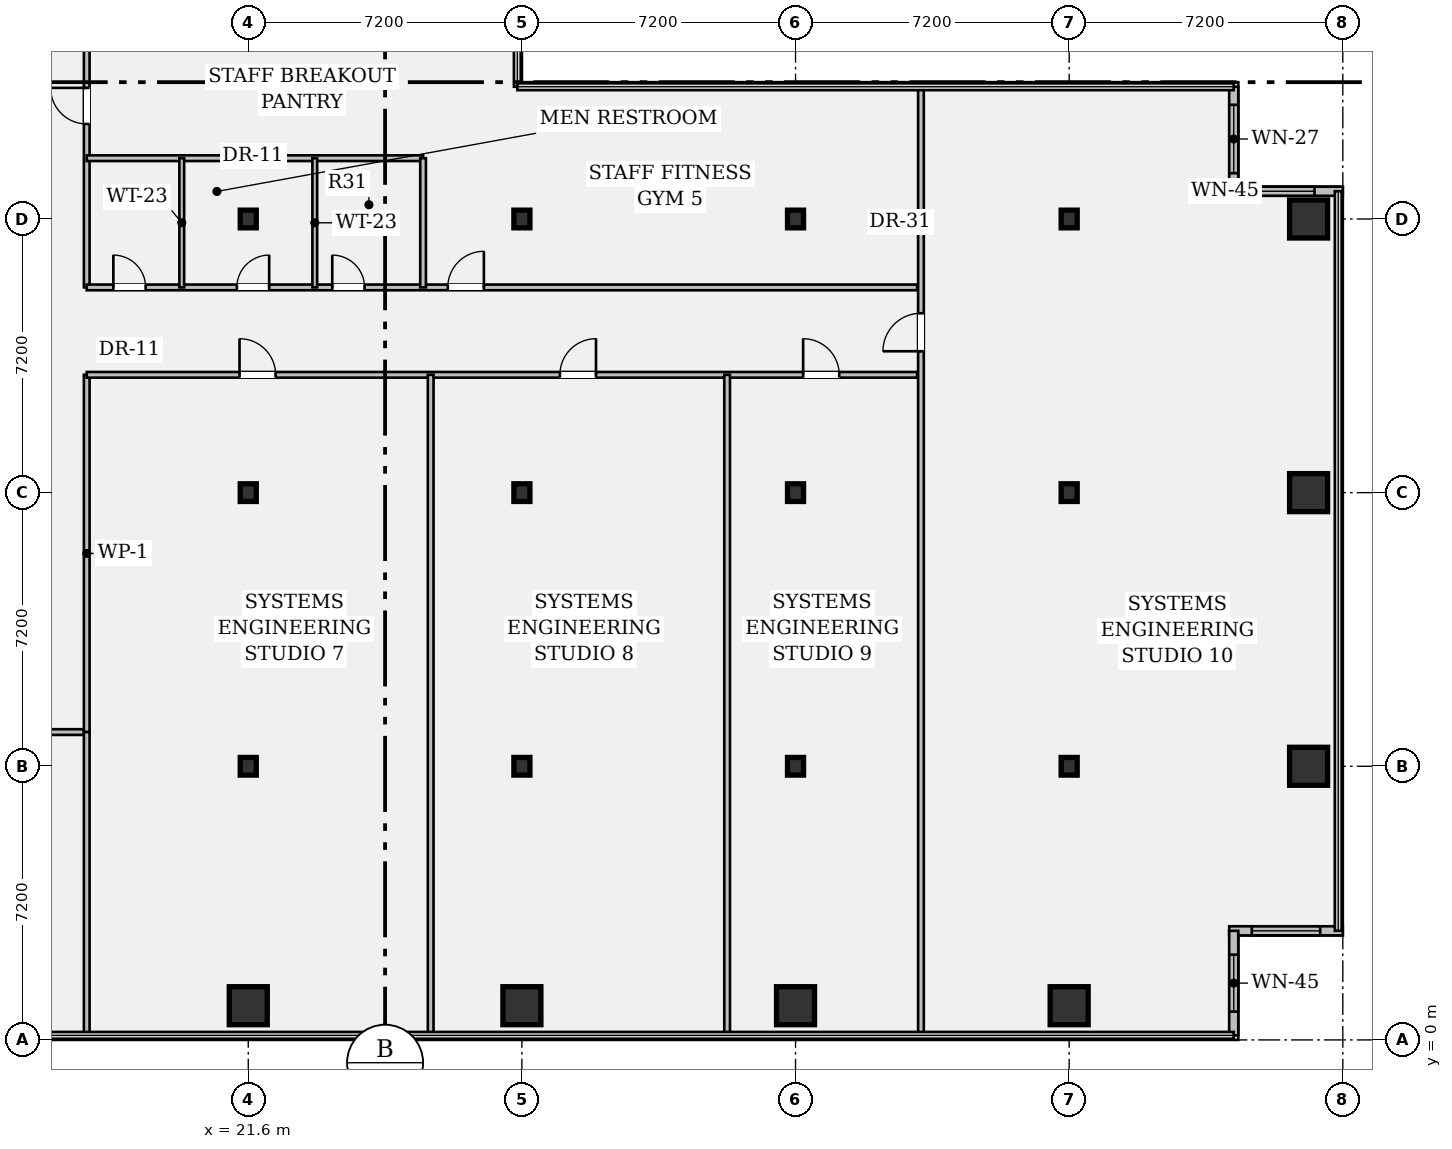
"""IFC4 building model, lengths in metres.
Left out: names, types, materials, properties, quantities, classifications, styles, units other than length and angle.
Written with IfcOpenShell. Run it as: python <this file> out.ifc"""

import sys

from ifc_helpers import new_model, si_unit, direction, frame, frame_2d, origin, origin_2d, place, context, subcontext, project, spatial, rectangle, hollow_rectangle, i_section, extrude, element, fill, save


model = new_model("IFC4")
c1 = context("Model", 3, precision=1e-05, world=origin(), true_north=direction((0.0, 1.0)))
c2 = subcontext(c1, "Body", "Model", "MODEL_VIEW")
j1 = project(units=[si_unit("LENGTHUNIT", "METRE"), si_unit("PLANEANGLEUNIT", "RADIAN")], contexts=[c1])
p1 = place(None, origin())
s1 = spatial("IfcSite", under=j1, at=p1, CompositionType="ELEMENT")
p2 = place(p1, origin())
s2 = spatial("IfcBuilding", under=s1, at=p2, CompositionType="ELEMENT")
p3 = place(p2, frame((0.0, 0.0, 73.5)))
s3 = spatial("IfcBuildingStorey", under=s2, at=p3, CompositionType="ELEMENT", Elevation=73.5)
p4 = place(p3, frame((21.6, 0.9, 0.0), z_axis=(0.0, 0.0, 1.0), x_axis=(1.0, 0.0, 0.0)))
e1 = element("IfcColumn", 1, at=p4, inside=s3, PredefinedType="COLUMN", context=c2, shape_type="SweptSolid", body=[
    extrude(hollow_rectangle(XDim=1.0, YDim=1.0, WallThickness=0.065, at=origin_2d()), origin(), (0.0, 0.0, 1.0), 3.57),
])
for number, where, z_axis, x_axis in (
    (2, (21.6, 7.2, 0.0), (0.0, 0.0, 1.0), (1.0, 0.0, 0.0)),
    (3, (21.6, 14.4, 0.0), (0.0, 0.0, 1.0), (1.0, 0.0, 0.0)),
    (4, (21.6, 21.6, 0.0), (0.0, 0.0, 1.0), (1.0, 0.0, 0.0)),
):
    element("IfcColumn", number, at=place(p3, frame(where, z_axis=z_axis, x_axis=x_axis)), inside=s3, PredefinedType="COLUMN", context=c2, shape_type="SweptSolid", body=[
        extrude(i_section(OverallWidth=0.422, OverallDepth=0.465, WebThickness=0.045, FlangeThickness=0.073, FilletRadius=0.018, at=origin_2d()), origin(), (0.0, 0.0, 1.0), 3.57),
    ])
p5 = place(p3, frame((28.8, 0.9, 0.0), z_axis=(0.0, 0.0, 1.0), x_axis=(1.0, 0.0, 0.0)))
e5 = element("IfcColumn", 5, at=p5, inside=s3, PredefinedType="COLUMN", context=c2, shape_type="SweptSolid", body=[
    extrude(hollow_rectangle(XDim=1.0, YDim=1.0, WallThickness=0.065, at=origin_2d()), origin(), (0.0, 0.0, 1.0), 3.57),
])
for number, where, z_axis, x_axis in (
    (6, (28.8, 7.2, 0.0), (0.0, 0.0, 1.0), (1.0, 0.0, 0.0)),
    (7, (28.8, 14.4, 0.0), (0.0, 0.0, 1.0), (1.0, 0.0, 0.0)),
    (8, (28.8, 21.6, 0.0), (0.0, 0.0, 1.0), (1.0, 0.0, 0.0)),
):
    element("IfcColumn", number, at=place(p3, frame(where, z_axis=z_axis, x_axis=x_axis)), inside=s3, PredefinedType="COLUMN", context=c2, shape_type="SweptSolid", body=[
        extrude(i_section(OverallWidth=0.422, OverallDepth=0.465, WebThickness=0.045, FlangeThickness=0.073, FilletRadius=0.018, at=origin_2d()), origin(), (0.0, 0.0, 1.0), 3.57),
    ])
p6 = place(p3, frame((36.0, 0.9, 0.0), z_axis=(0.0, 0.0, 1.0), x_axis=(1.0, 0.0, 0.0)))
e9 = element("IfcColumn", 9, at=p6, inside=s3, PredefinedType="COLUMN", context=c2, shape_type="SweptSolid", body=[
    extrude(hollow_rectangle(XDim=1.0, YDim=1.0, WallThickness=0.065, at=origin_2d()), origin(), (0.0, 0.0, 1.0), 3.57),
])
for number, where, z_axis, x_axis in (
    (10, (36.0, 7.2, 0.0), (0.0, 0.0, 1.0), (1.0, 0.0, 0.0)),
    (11, (36.0, 14.4, 0.0), (0.0, 0.0, 1.0), (1.0, 0.0, 0.0)),
    (12, (36.0, 21.6, 0.0), (0.0, 0.0, 1.0), (1.0, 0.0, 0.0)),
):
    element("IfcColumn", number, at=place(p3, frame(where, z_axis=z_axis, x_axis=x_axis)), inside=s3, PredefinedType="COLUMN", context=c2, shape_type="SweptSolid", body=[
        extrude(i_section(OverallWidth=0.422, OverallDepth=0.465, WebThickness=0.045, FlangeThickness=0.073, FilletRadius=0.018, at=origin_2d()), origin(), (0.0, 0.0, 1.0), 3.57),
    ])
p7 = place(p3, frame((43.2, 0.9, 0.0), z_axis=(0.0, 0.0, 1.0), x_axis=(1.0, 0.0, 0.0)))
e13 = element("IfcColumn", 13, at=p7, inside=s3, PredefinedType="COLUMN", context=c2, shape_type="SweptSolid", body=[
    extrude(hollow_rectangle(XDim=1.0, YDim=1.0, WallThickness=0.065, at=origin_2d()), origin(), (0.0, 0.0, 1.0), 3.57),
])
for number, where, z_axis, x_axis in (
    (14, (43.2, 7.2, 0.0), (0.0, 0.0, 1.0), (1.0, 0.0, 0.0)),
    (15, (43.2, 14.4, 0.0), (0.0, 0.0, 1.0), (1.0, 0.0, 0.0)),
    (16, (43.2, 21.6, 0.0), (0.0, 0.0, 1.0), (1.0, 0.0, 0.0)),
):
    element("IfcColumn", number, at=place(p3, frame(where, z_axis=z_axis, x_axis=x_axis)), inside=s3, PredefinedType="COLUMN", context=c2, shape_type="SweptSolid", body=[
        extrude(i_section(OverallWidth=0.422, OverallDepth=0.465, WebThickness=0.045, FlangeThickness=0.073, FilletRadius=0.018, at=origin_2d()), origin(), (0.0, 0.0, 1.0), 3.57),
    ])
for number, where, z_axis, x_axis in (
    (17, (49.5, 7.2, 0.0), (0.0, 0.0, 1.0), (1.0, 0.0, 0.0)),
    (18, (49.5, 14.4, 0.0), (0.0, 0.0, 1.0), (1.0, 0.0, 0.0)),
    (19, (49.5, 21.6, 0.0), (0.0, 0.0, 1.0), (1.0, 0.0, 0.0)),
):
    element("IfcColumn", number, at=place(p3, frame(where, z_axis=z_axis, x_axis=x_axis)), inside=s3, PredefinedType="COLUMN", context=c2, shape_type="SweptSolid", body=[
        extrude(hollow_rectangle(XDim=1.0, YDim=1.0, WallThickness=0.065, at=origin_2d()), origin(), (0.0, 0.0, 1.0), 3.57),
    ])
p8 = place(p3, frame((47.53, 25.08, 0.0), z_axis=(0.0, 0.0, 1.0), x_axis=(0.0, -1.0, 0.0)))
e20 = element("IfcWall", 20, at=p8, inside=s3, PredefinedType="STANDARD", context=c2, shape_type="SweptSolid", body=[
    extrude(rectangle(XDim=2.75, YDim=0.24, at=frame_2d((1.375, 0.0))), origin(), (0.0, 0.0, 1.0), 3.57),
])
p9 = place(p8, frame((0.475, 0.0, 0.95)))
e21 = element("IfcOpeningElement", 21, at=p9, cuts=e20, PredefinedType="OPENING", context=c2, shape_type="SweptSolid", body=[
    extrude(rectangle(XDim=1.8, YDim=1.35, at=frame_2d((0.9, 0.675))), frame((0.0, 0.132, 0.0), z_axis=(0.0, -1.0, 0.0), x_axis=(1.0, 0.0, 0.0)), (0.0, 0.0, 1.0), 0.264),
])
p10 = place(p3, frame((47.41, 22.33, 0.0), z_axis=(0.0, 0.0, 1.0), x_axis=(1.0, 0.0, 0.0)))
e22 = element("IfcWall", 22, at=p10, inside=s3, PredefinedType="STANDARD", context=c2, shape_type="SweptSolid", body=[
    extrude(rectangle(XDim=2.99, YDim=0.24, at=frame_2d((1.495, 0.0))), origin(), (0.0, 0.0, 1.0), 3.57),
])
p11 = place(p10, frame((0.745, 0.0, 0.95)))
e23 = element("IfcOpeningElement", 23, at=p11, cuts=e22, PredefinedType="OPENING", context=c2, shape_type="SweptSolid", body=[
    extrude(rectangle(XDim=1.5, YDim=1.8, at=frame_2d((0.75, 0.9))), frame((0.0, 0.132, 0.0), z_axis=(0.0, -1.0, 0.0), x_axis=(1.0, 0.0, 0.0)), (0.0, 0.0, 1.0), 0.264),
])
p12 = place(p3, frame((50.4, 2.87, 0.0), z_axis=(0.0, 0.0, 1.0), x_axis=(-1.0, 0.0, 0.0)))
e24 = element("IfcWall", 24, at=p12, inside=s3, PredefinedType="STANDARD", context=c2, shape_type="SweptSolid", body=[
    extrude(rectangle(XDim=2.99, YDim=0.24, at=frame_2d((1.495, 0.0))), origin(), (0.0, 0.0, 1.0), 3.57),
])
p13 = place(p12, frame((0.595, 0.0, 0.95)))
e25 = element("IfcOpeningElement", 25, at=p13, cuts=e24, PredefinedType="OPENING", context=c2, shape_type="SweptSolid", body=[
    extrude(rectangle(XDim=1.8, YDim=1.35, at=frame_2d((0.9, 0.675))), frame((0.0, 0.132, 0.0), z_axis=(0.0, -1.0, 0.0), x_axis=(1.0, 0.0, 0.0)), (0.0, 0.0, 1.0), 0.264),
])
p14 = place(p3, frame((47.53, 2.87, 0.0), z_axis=(0.0, 0.0, 1.0), x_axis=(0.0, -1.0, 0.0)))
e26 = element("IfcWall", 26, at=p14, inside=s3, PredefinedType="STANDARD", context=c2, shape_type="SweptSolid", body=[
    extrude(rectangle(XDim=2.75, YDim=0.24, at=frame_2d((1.375, 0.0))), origin(), (0.0, 0.0, 1.0), 3.57),
])
p15 = place(p14, frame((0.625, 0.0, 0.95)))
e27 = element("IfcOpeningElement", 27, at=p15, cuts=e26, PredefinedType="OPENING", context=c2, shape_type="SweptSolid", body=[
    extrude(rectangle(XDim=1.5, YDim=1.8, at=frame_2d((0.75, 0.9))), frame((0.0, 0.132, 0.0), z_axis=(0.0, -1.0, 0.0), x_axis=(1.0, 0.0, 0.0)), (0.0, 0.0, 1.0), 0.264),
])
p16 = place(p3, frame((14.4, 8.1, 0.0), z_axis=(0.0, 0.0, 1.0), x_axis=(1.0, 0.0, 0.0)))
e28 = element("IfcWall", 28, at=p16, inside=s3, PredefinedType="PARTITIONING", context=c2, shape_type="SweptSolid", body=[
    extrude(rectangle(XDim=2.95, YDim=0.15, at=frame_2d((1.475, 0.0))), origin(), (0.0, 0.0, 1.0), 3.088),
])
p17 = place(p16, frame((0.95, 0.0, 0.0)))
e29 = element("IfcOpeningElement", 29, at=p17, cuts=e28, PredefinedType="OPENING", context=c2, shape_type="SweptSolid", body=[
    extrude(rectangle(XDim=0.95, YDim=2.15, at=frame_2d((0.475, 1.075))), frame((0.0, 0.087, 0.0), z_axis=(0.0, -1.0, 0.0), x_axis=(1.0, 0.0, 0.0)), (0.0, 0.0, 1.0), 0.174),
])
p18 = place(p3, frame((17.35, 8.1, 0.0), z_axis=(0.0, 0.0, 1.0), x_axis=(0.0, 1.0, 0.0)))
e30 = element("IfcWall", 30, at=p18, inside=s3, PredefinedType="PARTITIONING", context=c2, shape_type="SweptSolid", body=[
    extrude(rectangle(XDim=9.4, YDim=0.15, at=frame_2d((4.7, 0.0))), origin(), (0.0, 0.0, 1.0), 2.783),
])
p19 = place(p3, frame((17.35, 19.8, 0.0), z_axis=(0.0, 0.0, 1.0), x_axis=(0.0, 1.0, 0.0)))
e31 = element("IfcWall", 31, at=p19, inside=s3, PredefinedType="PARTITIONING", context=c2, shape_type="SweptSolid", body=[
    extrude(rectangle(XDim=16.1, YDim=0.15, at=frame_2d((8.05, 0.0))), origin(), (0.0, 0.0, 1.0), 2.783),
])
p20 = place(p19, frame((4.3, 0.0, 0.0)))
e32 = element("IfcOpeningElement", 32, at=p20, cuts=e31, PredefinedType="OPENING", context=c2, shape_type="SweptSolid", body=[
    extrude(rectangle(XDim=0.95, YDim=2.15, at=frame_2d((0.475, 1.075))), frame((0.0, 0.087, 0.0), z_axis=(0.0, -1.0, 0.0), x_axis=(1.0, 0.0, 0.0)), (0.0, 0.0, 1.0), 0.174),
])
p21 = place(p19, frame((8.0, 0.0, 0.0)))
e33 = element("IfcOpeningElement", 33, at=p21, cuts=e31, PredefinedType="OPENING", context=c2, shape_type="SweptSolid", body=[
    extrude(rectangle(XDim=0.95, YDim=2.15, at=frame_2d((0.475, 1.075))), frame((0.0, 0.087, 0.0), z_axis=(0.0, -1.0, 0.0), x_axis=(1.0, 0.0, 0.0)), (0.0, 0.0, 1.0), 0.174),
])
p22 = place(p19, frame((12.5, 0.0, 0.0)))
e34 = element("IfcOpeningElement", 34, at=p22, cuts=e31, PredefinedType="OPENING", context=c2, shape_type="SweptSolid", body=[
    extrude(rectangle(XDim=0.95, YDim=2.15, at=frame_2d((0.475, 1.075))), frame((0.0, 0.087, 0.0), z_axis=(0.0, -1.0, 0.0), x_axis=(1.0, 0.0, 0.0)), (0.0, 0.0, 1.0), 0.174),
])
p23 = place(p3, frame((17.35, 17.5, 0.0), z_axis=(0.0, 0.0, 1.0), x_axis=(1.0, 0.0, 0.0)))
e35 = element("IfcWall", 35, at=p23, inside=s3, PredefinedType="PARTITIONING", context=c2, shape_type="SweptSolid", body=[
    extrude(rectangle(XDim=21.85, YDim=0.15, at=frame_2d((10.925, 0.0))), origin(), (0.0, 0.0, 1.0), 2.783),
])
p24 = place(p23, frame((4.02, 0.0, 0.0)))
e36 = element("IfcOpeningElement", 36, at=p24, cuts=e35, PredefinedType="OPENING", context=c2, shape_type="SweptSolid", body=[
    extrude(rectangle(XDim=0.95, YDim=2.15, at=frame_2d((0.475, 1.075))), frame((0.0, 0.087, 0.0), z_axis=(0.0, -1.0, 0.0), x_axis=(1.0, 0.0, 0.0)), (0.0, 0.0, 1.0), 0.174),
])
p25 = place(p23, frame((12.45, 0.0, 0.0)))
e37 = element("IfcOpeningElement", 37, at=p25, cuts=e35, PredefinedType="OPENING", context=c2, shape_type="SweptSolid", body=[
    extrude(rectangle(XDim=0.95, YDim=2.15, at=frame_2d((0.475, 1.075))), frame((0.0, 0.087, 0.0), z_axis=(0.0, -1.0, 0.0), x_axis=(1.0, 0.0, 0.0)), (0.0, 0.0, 1.0), 0.174),
])
p26 = place(p23, frame((18.85, 0.0, 0.0)))
e38 = element("IfcOpeningElement", 38, at=p26, cuts=e35, PredefinedType="OPENING", context=c2, shape_type="SweptSolid", body=[
    extrude(rectangle(XDim=0.95, YDim=2.15, at=frame_2d((0.475, 1.075))), frame((0.0, 0.087, 0.0), z_axis=(0.0, -1.0, 0.0), x_axis=(1.0, 0.0, 0.0)), (0.0, 0.0, 1.0), 0.174),
])
p27 = place(p3, frame((17.35, 19.8, 0.0), z_axis=(0.0, 0.0, 1.0), x_axis=(1.0, 0.0, 0.0)))
e39 = element("IfcWall", 39, at=p27, inside=s3, PredefinedType="PARTITIONING", context=c2, shape_type="SweptSolid", body=[
    extrude(rectangle(XDim=21.85, YDim=0.15, at=frame_2d((10.925, 0.0))), origin(), (0.0, 0.0, 1.0), 2.783),
])
p28 = place(p27, frame((0.7, 0.0, 0.0)))
e40 = element("IfcOpeningElement", 40, at=p28, cuts=e39, PredefinedType="OPENING", context=c2, shape_type="SweptSolid", body=[
    extrude(rectangle(XDim=0.85, YDim=2.15, at=frame_2d((0.425, 1.075))), frame((0.0, 0.087, 0.0), z_axis=(0.0, -1.0, 0.0), x_axis=(1.0, 0.0, 0.0)), (0.0, 0.0, 1.0), 0.174),
])
p29 = place(p27, frame((3.95, 0.0, 0.0)))
e41 = element("IfcOpeningElement", 41, at=p29, cuts=e39, PredefinedType="OPENING", context=c2, shape_type="SweptSolid", body=[
    extrude(rectangle(XDim=0.85, YDim=2.15, at=frame_2d((0.425, 1.075))), frame((0.0, 0.087, 0.0), z_axis=(0.0, -1.0, 0.0), x_axis=(1.0, 0.0, 0.0)), (0.0, 0.0, 1.0), 0.174),
])
p30 = place(p27, frame((6.46, 0.0, 0.0)))
e42 = element("IfcOpeningElement", 42, at=p30, cuts=e39, PredefinedType="OPENING", context=c2, shape_type="SweptSolid", body=[
    extrude(rectangle(XDim=0.85, YDim=2.15, at=frame_2d((0.425, 1.075))), frame((0.0, 0.087, 0.0), z_axis=(0.0, -1.0, 0.0), x_axis=(1.0, 0.0, 0.0)), (0.0, 0.0, 1.0), 0.174),
])
p31 = place(p27, frame((9.5, 0.0, 0.0)))
e43 = element("IfcOpeningElement", 43, at=p31, cuts=e39, PredefinedType="OPENING", context=c2, shape_type="SweptSolid", body=[
    extrude(rectangle(XDim=0.95, YDim=2.15, at=frame_2d((0.475, 1.075))), frame((0.0, 0.087, 0.0), z_axis=(0.0, -1.0, 0.0), x_axis=(1.0, 0.0, 0.0)), (0.0, 0.0, 1.0), 0.174),
])
p32 = place(p3, frame((39.3, 0.12, 0.0), z_axis=(0.0, 0.0, 1.0), x_axis=(0.0, 1.0, 0.0)))
e44 = element("IfcWall", 44, at=p32, inside=s3, PredefinedType="PARTITIONING", context=c2, shape_type="SweptSolid", body=[
    extrude(rectangle(XDim=24.96, YDim=0.15, at=frame_2d((12.48, 0.0))), origin(), (0.0, 0.0, 1.0), 2.783),
])
p33 = place(p32, frame((18.0, 0.0, 0.0)))
e45 = element("IfcOpeningElement", 45, at=p33, cuts=e44, PredefinedType="OPENING", context=c2, shape_type="SweptSolid", body=[
    extrude(rectangle(XDim=1.0, YDim=2.15, at=frame_2d((0.5, 1.075))), frame((0.0, 0.087, 0.0), z_axis=(0.0, -1.0, 0.0), x_axis=(1.0, 0.0, 0.0)), (0.0, 0.0, 1.0), 0.174),
])
p34 = place(p3, frame((17.35, 23.2, 0.0), z_axis=(0.0, 0.0, 1.0), x_axis=(1.0, 0.0, 0.0)))
e46 = element("IfcWall", 46, at=p34, inside=s3, PredefinedType="PARTITIONING", context=c2, shape_type="SweptSolid", body=[
    extrude(rectangle(XDim=8.85, YDim=0.15, at=frame_2d((4.425, 0.0))), origin(), (0.0, 0.0, 1.0), 2.783),
])
p35 = place(p3, frame((26.2, 19.8, 0.0), z_axis=(0.0, 0.0, 1.0), x_axis=(0.0, 1.0, 0.0)))
e47 = element("IfcWall", 47, at=p35, inside=s3, PredefinedType="PARTITIONING", context=c2, shape_type="SweptSolid", body=[
    extrude(rectangle(XDim=3.4, YDim=0.15, at=frame_2d((1.7, 0.0))), origin(), (0.0, 0.0, 1.0), 2.783),
])
for number, where, z_axis, x_axis in (
    (48, (19.85, 19.8, 0.0), (0.0, 0.0, 1.0), (0.0, 1.0, 0.0)),
    (49, (23.35, 19.8, 0.0), (0.0, 0.0, 1.0), (0.0, 1.0, 0.0)),
):
    element("IfcWall", number, at=place(p3, frame(where, z_axis=z_axis, x_axis=x_axis)), inside=s3, PredefinedType="PARTITIONING", context=c2, shape_type="SweptSolid", body=[
        extrude(rectangle(XDim=3.4, YDim=0.125, at=frame_2d((1.7, 0.0))), origin(), (0.0, 0.0, 1.0), 2.783),
    ])
p36 = place(p3, frame((17.35, 0.12, 0.0), z_axis=(0.0, 0.0, 1.0), x_axis=(0.0, 1.0, 0.0)))
e50 = element("IfcWall", 50, at=p36, inside=s3, PredefinedType="PARTITIONING", context=c2, shape_type="SweptSolid", body=[
    extrude(rectangle(XDim=7.98, YDim=0.15, at=frame_2d((3.99, 0.0))), origin(), (0.0, 0.0, 1.0), 2.783),
])
for number, where, z_axis, x_axis in (
    (51, (26.4, 0.12, 0.0), (0.0, 0.0, 1.0), (0.0, 1.0, 0.0)),
    (52, (34.2, 0.12, 0.0), (0.0, 0.0, 1.0), (0.0, 1.0, 0.0)),
):
    element("IfcWall", number, at=place(p3, frame(where, z_axis=z_axis, x_axis=x_axis)), inside=s3, PredefinedType="PARTITIONING", context=c2, shape_type="SweptSolid", body=[
        extrude(rectangle(XDim=17.38, YDim=0.15, at=frame_2d((8.69, 0.0))), origin(), (0.0, 0.0, 1.0), 2.783),
    ])
p37 = place(p9, origin())
e53 = element("IfcWindow", 53, at=p37, inside=s3, PartitioningType="SINGLE_PANEL", PredefinedType="WINDOW", context=c2, shape_type="SweptSolid", body=[
    extrude(rectangle(XDim=1.8, YDim=1.35, at=frame_2d((0.9, 0.675))), frame((0.0, 0.03, 0.0), z_axis=(0.0, -1.0, 0.0), x_axis=(1.0, 0.0, 0.0)), (0.0, 0.0, 1.0), 0.06),
])
fill(e21, e53)
p38 = place(p11, origin())
e54 = element("IfcWindow", 54, at=p38, inside=s3, PartitioningType="SINGLE_PANEL", PredefinedType="WINDOW", context=c2, shape_type="SweptSolid", body=[
    extrude(rectangle(XDim=1.5, YDim=1.8, at=frame_2d((0.75, 0.9))), frame((0.0, 0.03, 0.0), z_axis=(0.0, -1.0, 0.0), x_axis=(1.0, 0.0, 0.0)), (0.0, 0.0, 1.0), 0.06),
])
fill(e23, e54)
p39 = place(p13, origin())
e55 = element("IfcWindow", 55, at=p39, inside=s3, PartitioningType="SINGLE_PANEL", PredefinedType="WINDOW", context=c2, shape_type="SweptSolid", body=[
    extrude(rectangle(XDim=1.8, YDim=1.35, at=frame_2d((0.9, 0.675))), frame((0.0, 0.03, 0.0), z_axis=(0.0, -1.0, 0.0), x_axis=(1.0, 0.0, 0.0)), (0.0, 0.0, 1.0), 0.06),
])
fill(e25, e55)
p40 = place(p15, origin())
e56 = element("IfcWindow", 56, at=p40, inside=s3, PartitioningType="SINGLE_PANEL", PredefinedType="WINDOW", context=c2, shape_type="SweptSolid", body=[
    extrude(rectangle(XDim=1.5, YDim=1.8, at=frame_2d((0.75, 0.9))), frame((0.0, 0.03, 0.0), z_axis=(0.0, -1.0, 0.0), x_axis=(1.0, 0.0, 0.0)), (0.0, 0.0, 1.0), 0.06),
])
fill(e27, e56)
p41 = place(p28, origin())
e57 = element("IfcDoor", 57, at=p41, inside=s3, OperationType="SINGLE_SWING_LEFT", PredefinedType="DOOR", context=c2, shape_type="SweptSolid", body=[
    extrude(rectangle(XDim=0.85, YDim=2.15, at=frame_2d((0.425, 1.075))), frame((0.0, 0.025, 0.0), z_axis=(0.0, -1.0, 0.0), x_axis=(1.0, 0.0, 0.0)), (0.0, 0.0, 1.0), 0.05),
])
fill(e40, e57)
p42 = place(p29, origin())
e58 = element("IfcDoor", 58, at=p42, inside=s3, OperationType="SINGLE_SWING_RIGHT", PredefinedType="DOOR", context=c2, shape_type="SweptSolid", body=[
    extrude(rectangle(XDim=0.85, YDim=2.15, at=frame_2d((0.425, 1.075))), frame((0.0, 0.025, 0.0), z_axis=(0.0, -1.0, 0.0), x_axis=(1.0, 0.0, 0.0)), (0.0, 0.0, 1.0), 0.05),
])
fill(e41, e58)
p43 = place(p30, origin())
e59 = element("IfcDoor", 59, at=p43, inside=s3, OperationType="SINGLE_SWING_LEFT", PredefinedType="DOOR", context=c2, shape_type="SweptSolid", body=[
    extrude(rectangle(XDim=0.85, YDim=2.15, at=frame_2d((0.425, 1.075))), frame((0.0, 0.025, 0.0), z_axis=(0.0, -1.0, 0.0), x_axis=(1.0, 0.0, 0.0)), (0.0, 0.0, 1.0), 0.05),
])
fill(e42, e59)
p44 = place(p20, origin())
e60 = element("IfcDoor", 60, at=p44, inside=s3, OperationType="SINGLE_SWING_RIGHT", PredefinedType="DOOR", context=c2, shape_type="SweptSolid", body=[
    extrude(rectangle(XDim=0.95, YDim=2.15, at=frame_2d((0.475, 1.075))), frame((0.0, 0.025, 0.0), z_axis=(0.0, -1.0, 0.0), x_axis=(1.0, 0.0, 0.0)), (0.0, 0.0, 1.0), 0.05),
])
fill(e32, e60)
p45 = place(p31, origin())
e61 = element("IfcDoor", 61, at=p45, inside=s3, OperationType="SINGLE_SWING_RIGHT", PredefinedType="DOOR", context=c2, shape_type="SweptSolid", body=[
    extrude(rectangle(XDim=0.95, YDim=2.15, at=frame_2d((0.475, 1.075))), frame((0.0, 0.025, 0.0), z_axis=(0.0, -1.0, 0.0), x_axis=(1.0, 0.0, 0.0)), (0.0, 0.0, 1.0), 0.05),
])
fill(e43, e61)
p46 = place(p24, origin())
e62 = element("IfcDoor", 62, at=p46, inside=s3, OperationType="SINGLE_SWING_LEFT", PredefinedType="DOOR", context=c2, shape_type="SweptSolid", body=[
    extrude(rectangle(XDim=0.95, YDim=2.15, at=frame_2d((0.475, 1.075))), frame((0.0, 0.025, 0.0), z_axis=(0.0, -1.0, 0.0), x_axis=(1.0, 0.0, 0.0)), (0.0, 0.0, 1.0), 0.05),
])
fill(e36, e62)
p47 = place(p25, origin())
e63 = element("IfcDoor", 63, at=p47, inside=s3, OperationType="SINGLE_SWING_RIGHT", PredefinedType="DOOR", context=c2, shape_type="SweptSolid", body=[
    extrude(rectangle(XDim=0.95, YDim=2.15, at=frame_2d((0.475, 1.075))), frame((0.0, 0.025, 0.0), z_axis=(0.0, -1.0, 0.0), x_axis=(1.0, 0.0, 0.0)), (0.0, 0.0, 1.0), 0.05),
])
fill(e37, e63)
p48 = place(p26, origin())
e64 = element("IfcDoor", 64, at=p48, inside=s3, OperationType="SINGLE_SWING_LEFT", PredefinedType="DOOR", context=c2, shape_type="SweptSolid", body=[
    extrude(rectangle(XDim=0.95, YDim=2.15, at=frame_2d((0.475, 1.075))), frame((0.0, 0.025, 0.0), z_axis=(0.0, -1.0, 0.0), x_axis=(1.0, 0.0, 0.0)), (0.0, 0.0, 1.0), 0.05),
])
fill(e38, e64)
p49 = place(p33, origin())
e65 = element("IfcDoor", 65, at=p49, inside=s3, OperationType="SINGLE_SWING_LEFT", PredefinedType="DOOR", context=c2, shape_type="SweptSolid", body=[
    extrude(rectangle(XDim=1.0, YDim=2.15, at=frame_2d((0.5, 1.075))), frame((0.0, 0.025, 0.0), z_axis=(0.0, -1.0, 0.0), x_axis=(1.0, 0.0, 0.0)), (0.0, 0.0, 1.0), 0.05),
])
fill(e45, e65)
save(model, sys.argv[1])
